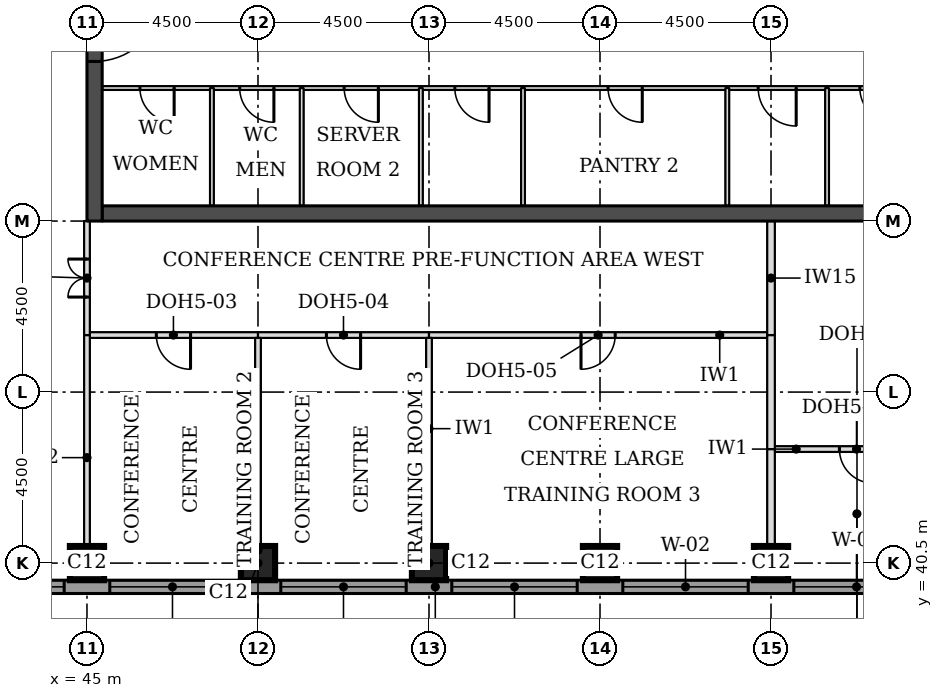
"""IFC4 building model, lengths in metres.
Left out: names, types, materials, properties, quantities, classifications, styles, units other than length and angle.
Written with IfcOpenShell. Run it as: python <this file> out.ifc"""

import sys

from ifc_helpers import new_model, si_unit, direction, frame, frame_2d, origin, origin_2d, place, context, subcontext, project, spatial, rectangle, extrude, element, fill, save


model = new_model("IFC4")
c1 = context("Model", 3, precision=1e-05, world=origin(), true_north=direction((0.0, 1.0)))
c2 = subcontext(c1, "Body", "Model", "MODEL_VIEW")
j1 = project(units=[si_unit("LENGTHUNIT", "METRE"), si_unit("PLANEANGLEUNIT", "RADIAN")], contexts=[c1])
p1 = place(None, origin())
s1 = spatial("IfcSite", under=j1, at=p1, CompositionType="ELEMENT")
p2 = place(p1, origin())
s2 = spatial("IfcBuilding", under=s1, at=p2, CompositionType="ELEMENT")
p3 = place(p2, frame((0.0, 0.0, 181.0)))
s3 = spatial("IfcBuildingStorey", under=s2, at=p3, CompositionType="ELEMENT", Elevation=181.0)
for number, where, z_axis, x_axis in (
    (1, (45.0, 40.5, 0.0), (0.0, 0.0, 1.0), (1.0, 0.0, 0.0)),
    (2, (49.5, 40.5, 0.0), (0.0, 0.0, 1.0), (1.0, 0.0, 0.0)),
    (3, (54.0, 40.5, 0.0), (0.0, 0.0, 1.0), (1.0, 0.0, 0.0)),
    (4, (58.5, 40.5, 0.0), (0.0, 0.0, 1.0), (1.0, 0.0, 0.0)),
    (5, (63.0, 40.5, 0.0), (0.0, 0.0, 1.0), (1.0, 0.0, 0.0)),
):
    element("IfcColumn", number, at=place(p3, frame(where, z_axis=z_axis, x_axis=x_axis)), inside=s3, PredefinedType="COLUMN", context=c2, shape_type="SweptSolid", body=[
        extrude(rectangle(XDim=0.9, YDim=0.9, at=origin_2d()), origin(), (0.0, 0.0, 1.0), 3.7),
    ])
p4 = place(p3, frame((45.4, 49.7, 0.0), z_axis=(0.0, 0.0, 1.0), x_axis=(1.0, 0.0, 0.0)))
e6 = element("IfcWall", 6, at=p4, inside=s3, PredefinedType="SHEAR", context=c2, shape_type="SweptSolid", body=[
    extrude(rectangle(XDim=21.7, YDim=0.4, at=frame_2d((10.85, 0.0))), origin(), (0.0, 0.0, 1.0), 3.7),
])
p5 = place(p3, frame((45.2, 49.5, 0.0), z_axis=(0.0, 0.0, 1.0), x_axis=(0.0, 1.0, 0.0)))
e7 = element("IfcWall", 7, at=p5, inside=s3, PredefinedType="SHEAR", context=c2, shape_type="SweptSolid", body=[
    extrude(rectangle(XDim=22.5, YDim=0.4, at=frame_2d((11.25, 0.0))), origin(), (0.0, 0.0, 1.0), 3.7),
])
p6 = place(p5, frame((4.2, 0.0, 0.0)))
e8 = element("IfcOpeningElement", 8, at=p6, cuts=e7, PredefinedType="OPENING", context=c2, shape_type="SweptSolid", body=[
    extrude(rectangle(XDim=1.8, YDim=2.1, at=frame_2d((0.9, 1.05))), frame((0.0, 0.21, 0.0), z_axis=(0.0, -1.0, 0.0), x_axis=(1.0, 0.0, 0.0)), (0.0, 0.0, 1.0), 0.42),
])
p7 = place(p5, frame((6.9, 0.0, 0.0)))
e9 = element("IfcOpeningElement", 9, at=p7, cuts=e7, PredefinedType="OPENING", context=c2, shape_type="SweptSolid", body=[
    extrude(rectangle(XDim=1.1, YDim=2.1, at=frame_2d((0.55, 1.05))), frame((0.0, 0.21, 0.0), z_axis=(0.0, -1.0, 0.0), x_axis=(1.0, 0.0, 0.0)), (0.0, 0.0, 1.0), 0.42),
])
p8 = place(p5, frame((13.6, 0.0, 0.0)))
e10 = element("IfcOpeningElement", 10, at=p8, cuts=e7, PredefinedType="OPENING", context=c2, shape_type="SweptSolid", body=[
    extrude(rectangle(XDim=1.1, YDim=2.1, at=frame_2d((0.55, 1.05))), frame((0.0, 0.21, 0.0), z_axis=(0.0, -1.0, 0.0), x_axis=(1.0, 0.0, 0.0)), (0.0, 0.0, 1.0), 0.42),
])
p9 = place(p5, frame((16.5, 0.0, 0.0)))
e11 = element("IfcOpeningElement", 11, at=p9, cuts=e7, PredefinedType="OPENING", context=c2, shape_type="SweptSolid", body=[
    extrude(rectangle(XDim=1.8, YDim=2.1, at=frame_2d((0.9, 1.05))), frame((0.0, 0.21, 0.0), z_axis=(0.0, -1.0, 0.0), x_axis=(1.0, 0.0, 0.0)), (0.0, 0.0, 1.0), 0.42),
])
p10 = place(p3, frame((36.0, 39.875, 0.0), z_axis=(0.0, 0.0, 1.0), x_axis=(1.0, 0.0, 0.0)))
e12 = element("IfcWall", 12, at=p10, inside=s3, PredefinedType="STANDARD", context=c2, shape_type="SweptSolid", body=[
    extrude(rectangle(XDim=36.331, YDim=0.35, at=frame_2d((18.166, 0.0))), origin(), (0.0, 0.0, 1.0), 3.525),
])
p11 = place(p10, frame((5.1, 0.0, 0.9)))
e13 = element("IfcOpeningElement", 13, at=p11, cuts=e12, PredefinedType="OPENING", context=c2, shape_type="SweptSolid", body=[
    extrude(rectangle(XDim=3.3, YDim=1.9, at=frame_2d((1.65, 0.95))), frame((0.0, 0.185, 0.0), z_axis=(0.0, -1.0, 0.0), x_axis=(1.0, 0.0, 0.0)), (0.0, 0.0, 1.0), 0.37),
])
p12 = place(p10, frame((9.6, 0.0, 0.9)))
e14 = element("IfcOpeningElement", 14, at=p12, cuts=e12, PredefinedType="OPENING", context=c2, shape_type="SweptSolid", body=[
    extrude(rectangle(XDim=3.3, YDim=1.9, at=frame_2d((1.65, 0.95))), frame((0.0, 0.185, 0.0), z_axis=(0.0, -1.0, 0.0), x_axis=(1.0, 0.0, 0.0)), (0.0, 0.0, 1.0), 0.37),
])
p13 = place(p10, frame((14.1, 0.0, 0.9)))
e15 = element("IfcOpeningElement", 15, at=p13, cuts=e12, PredefinedType="OPENING", context=c2, shape_type="SweptSolid", body=[
    extrude(rectangle(XDim=3.3, YDim=1.9, at=frame_2d((1.65, 0.95))), frame((0.0, 0.185, 0.0), z_axis=(0.0, -1.0, 0.0), x_axis=(1.0, 0.0, 0.0)), (0.0, 0.0, 1.0), 0.37),
])
p14 = place(p10, frame((18.6, 0.0, 0.9)))
e16 = element("IfcOpeningElement", 16, at=p14, cuts=e12, PredefinedType="OPENING", context=c2, shape_type="SweptSolid", body=[
    extrude(rectangle(XDim=3.3, YDim=1.9, at=frame_2d((1.65, 0.95))), frame((0.0, 0.185, 0.0), z_axis=(0.0, -1.0, 0.0), x_axis=(1.0, 0.0, 0.0)), (0.0, 0.0, 1.0), 0.37),
])
p15 = place(p10, frame((23.1, 0.0, 0.9)))
e17 = element("IfcOpeningElement", 17, at=p15, cuts=e12, PredefinedType="OPENING", context=c2, shape_type="SweptSolid", body=[
    extrude(rectangle(XDim=3.3, YDim=1.9, at=frame_2d((1.65, 0.95))), frame((0.0, 0.185, 0.0), z_axis=(0.0, -1.0, 0.0), x_axis=(1.0, 0.0, 0.0)), (0.0, 0.0, 1.0), 0.37),
])
p16 = place(p10, frame((27.6, 0.0, 0.9)))
e18 = element("IfcOpeningElement", 18, at=p16, cuts=e12, PredefinedType="OPENING", context=c2, shape_type="SweptSolid", body=[
    extrude(rectangle(XDim=3.3, YDim=1.9, at=frame_2d((1.65, 0.95))), frame((0.0, 0.185, 0.0), z_axis=(0.0, -1.0, 0.0), x_axis=(1.0, 0.0, 0.0)), (0.0, 0.0, 1.0), 0.37),
])
p17 = place(p3, frame((63.1, 43.5, 0.0), z_axis=(0.0, 0.0, 1.0), x_axis=(1.0, 0.0, 0.0)))
e19 = element("IfcWall", 19, at=p17, inside=s3, PredefinedType="PARTITIONING", context=c2, shape_type="SweptSolid", body=[
    extrude(rectangle(XDim=4.325, YDim=0.15, at=frame_2d((2.163, 0.0))), origin(), (0.0, 0.0, 1.0), 3.55),
])
p18 = place(p17, frame((1.7, 0.0, 0.0)))
e20 = element("IfcOpeningElement", 20, at=p18, cuts=e19, PredefinedType="OPENING", context=c2, shape_type="SweptSolid", body=[
    extrude(rectangle(XDim=0.9, YDim=2.1, at=frame_2d((0.45, 1.05))), frame((0.0, 0.085, 0.0), z_axis=(0.0, -1.0, 0.0), x_axis=(1.0, 0.0, 0.0)), (0.0, 0.0, 1.0), 0.17),
])
p19 = place(p3, frame((45.075, 46.5, 0.0), z_axis=(0.0, 0.0, 1.0), x_axis=(1.0, 0.0, 0.0)))
e21 = element("IfcWall", 21, at=p19, inside=s3, PredefinedType="PARTITIONING", context=c2, shape_type="SweptSolid", body=[
    extrude(rectangle(XDim=4.425, YDim=0.15, at=frame_2d((2.212, 0.0))), origin(), (0.0, 0.0, 1.0), 3.55),
])
p20 = place(p19, frame((1.75, 0.0, 0.0)))
e22 = element("IfcOpeningElement", 22, at=p20, cuts=e21, PredefinedType="OPENING", context=c2, shape_type="SweptSolid", body=[
    extrude(rectangle(XDim=0.9, YDim=2.1, at=frame_2d((0.45, 1.05))), frame((0.0, 0.085, 0.0), z_axis=(0.0, -1.0, 0.0), x_axis=(1.0, 0.0, 0.0)), (0.0, 0.0, 1.0), 0.17),
])
p21 = place(p3, frame((49.5, 46.5, 0.0), z_axis=(0.0, 0.0, 1.0), x_axis=(1.0, 0.0, 0.0)))
e23 = element("IfcWall", 23, at=p21, inside=s3, PredefinedType="PARTITIONING", context=c2, shape_type="SweptSolid", body=[
    extrude(rectangle(XDim=4.5, YDim=0.15, at=frame_2d((2.25, 0.0))), origin(), (0.0, 0.0, 1.0), 3.55),
])
p22 = place(p21, frame((1.8, 0.0, 0.0)))
e24 = element("IfcOpeningElement", 24, at=p22, cuts=e23, PredefinedType="OPENING", context=c2, shape_type="SweptSolid", body=[
    extrude(rectangle(XDim=0.9, YDim=2.1, at=frame_2d((0.45, 1.05))), frame((0.0, 0.085, 0.0), z_axis=(0.0, -1.0, 0.0), x_axis=(1.0, 0.0, 0.0)), (0.0, 0.0, 1.0), 0.17),
])
p23 = place(p3, frame((54.0, 46.5, 0.0), z_axis=(0.0, 0.0, 1.0), x_axis=(1.0, 0.0, 0.0)))
e25 = element("IfcWall", 25, at=p23, inside=s3, PredefinedType="PARTITIONING", context=c2, shape_type="SweptSolid", body=[
    extrude(rectangle(XDim=8.9, YDim=0.15, at=frame_2d((4.45, 0.0))), origin(), (0.0, 0.0, 1.0), 3.55),
])
p24 = place(p23, frame((4.0, 0.0, 0.0)))
e26 = element("IfcOpeningElement", 26, at=p24, cuts=e25, PredefinedType="OPENING", context=c2, shape_type="SweptSolid", body=[
    extrude(rectangle(XDim=0.9, YDim=2.1, at=frame_2d((0.45, 1.05))), frame((0.0, 0.085, 0.0), z_axis=(0.0, -1.0, 0.0), x_axis=(1.0, 0.0, 0.0)), (0.0, 0.0, 1.0), 0.17),
])
p25 = place(p3, frame((45.0, 40.05, 0.0), z_axis=(0.0, 0.0, 1.0), x_axis=(0.0, 1.0, 0.0)))
e27 = element("IfcWall", 27, at=p25, inside=s3, PredefinedType="PARTITIONING", context=c2, shape_type="SweptSolid", body=[
    extrude(rectangle(XDim=6.45, YDim=0.15, at=frame_2d((3.225, 0.0))), origin(), (0.0, 0.0, 1.0), 3.022),
])
for number, where, z_axis, x_axis in (
    (28, (49.5, 40.05, 0.0), (0.0, 0.0, 1.0), (0.0, 1.0, 0.0)),
    (29, (54.0, 40.05, 0.0), (0.0, 0.0, 1.0), (0.0, 1.0, 0.0)),
):
    element("IfcWall", number, at=place(p3, frame(where, z_axis=z_axis, x_axis=x_axis)), inside=s3, PredefinedType="PARTITIONING", context=c2, shape_type="SweptSolid", body=[
        extrude(rectangle(XDim=6.375, YDim=0.15, at=frame_2d((3.188, 0.0))), origin(), (0.0, 0.0, 1.0), 3.55),
    ])
p26 = place(p3, frame((63.0, 40.05, 0.0), z_axis=(0.0, 0.0, 1.0), x_axis=(0.0, 1.0, 0.0)))
e30 = element("IfcWall", 30, at=p26, inside=s3, PredefinedType="PARTITIONING", context=c2, shape_type="SweptSolid", body=[
    extrude(rectangle(XDim=3.45, YDim=0.2, at=frame_2d((1.725, 0.0))), origin(), (0.0, 0.0, 1.0), 3.55),
])
p27 = place(p3, frame((63.0, 43.5, 0.0), z_axis=(0.0, 0.0, 1.0), x_axis=(0.0, 1.0, 0.0)))
e31 = element("IfcWall", 31, at=p27, inside=s3, PredefinedType="PARTITIONING", context=c2, shape_type="SweptSolid", body=[
    extrude(rectangle(XDim=3.0, YDim=0.2, at=frame_2d((1.5, 0.0))), origin(), (0.0, 0.0, 1.0), 3.55),
])
p28 = place(p3, frame((45.0, 46.5, 0.0), z_axis=(0.0, 0.0, 1.0), x_axis=(0.0, 1.0, 0.0)))
e32 = element("IfcWall", 32, at=p28, inside=s3, PredefinedType="PARTITIONING", context=c2, shape_type="SweptSolid", body=[
    extrude(rectangle(XDim=3.0, YDim=0.15, at=frame_2d((1.5, 0.0))), origin(), (0.0, 0.0, 1.0), 3.022),
])
p29 = place(p28, frame((1.0, 0.0, 0.0)))
e33 = element("IfcOpeningElement", 33, at=p29, cuts=e32, PredefinedType="OPENING", context=c2, shape_type="SweptSolid", body=[
    extrude(rectangle(XDim=1.0, YDim=2.1, at=frame_2d((0.5, 1.05))), frame((0.0, 0.085, 0.0), z_axis=(0.0, -1.0, 0.0), x_axis=(1.0, 0.0, 0.0)), (0.0, 0.0, 1.0), 0.17),
])
p30 = place(p3, frame((63.0, 46.5, 0.0), z_axis=(0.0, 0.0, 1.0), x_axis=(0.0, 1.0, 0.0)))
e34 = element("IfcWall", 34, at=p30, inside=s3, PredefinedType="PARTITIONING", context=c2, shape_type="SweptSolid", body=[
    extrude(rectangle(XDim=3.0, YDim=0.2, at=frame_2d((1.5, 0.0))), origin(), (0.0, 0.0, 1.0), 3.55),
])
p31 = place(p3, frame((45.4, 53.0, 0.0), z_axis=(0.0, 0.0, 1.0), x_axis=(1.0, 0.0, 0.0)))
e35 = element("IfcWall", 35, at=p31, inside=s3, PredefinedType="PARTITIONING", context=c2, shape_type="SweptSolid", body=[
    extrude(rectangle(XDim=21.7, YDim=0.1, at=frame_2d((10.85, 0.0))), origin(), (0.0, 0.0, 1.0), 3.55),
])
p32 = place(p31, frame((19.938, 0.0, 0.0)))
e36 = element("IfcOpeningElement", 36, at=p32, cuts=e35, PredefinedType="OPENING", context=c2, shape_type="SweptSolid", body=[
    extrude(rectangle(XDim=0.9, YDim=2.1, at=frame_2d((0.45, 1.05))), frame((0.0, 0.06, 0.0), z_axis=(0.0, -1.0, 0.0), x_axis=(1.0, 0.0, 0.0)), (0.0, 0.0, 1.0), 0.12),
])
p33 = place(p31, frame((17.262, 0.0, 0.0)))
e37 = element("IfcOpeningElement", 37, at=p33, cuts=e35, PredefinedType="OPENING", context=c2, shape_type="SweptSolid", body=[
    extrude(rectangle(XDim=1.0, YDim=2.1, at=frame_2d((0.5, 1.05))), frame((0.0, 0.06, 0.0), z_axis=(0.0, -1.0, 0.0), x_axis=(1.0, 0.0, 0.0)), (0.0, 0.0, 1.0), 0.12),
])
p34 = place(p31, frame((0.994, 0.0, 0.0)))
e38 = element("IfcOpeningElement", 38, at=p34, cuts=e35, PredefinedType="OPENING", context=c2, shape_type="SweptSolid", body=[
    extrude(rectangle(XDim=0.9, YDim=2.1, at=frame_2d((0.45, 1.05))), frame((0.0, 0.06, 0.0), z_axis=(0.0, -1.0, 0.0), x_axis=(1.0, 0.0, 0.0)), (0.0, 0.0, 1.0), 0.12),
])
p35 = place(p31, frame((3.619, 0.0, 0.0)))
e39 = element("IfcOpeningElement", 39, at=p35, cuts=e35, PredefinedType="OPENING", context=c2, shape_type="SweptSolid", body=[
    extrude(rectangle(XDim=0.9, YDim=2.1, at=frame_2d((0.45, 1.05))), frame((0.0, 0.06, 0.0), z_axis=(0.0, -1.0, 0.0), x_axis=(1.0, 0.0, 0.0)), (0.0, 0.0, 1.0), 0.12),
])
p36 = place(p31, frame((6.368, 0.0, 0.0)))
e40 = element("IfcOpeningElement", 40, at=p36, cuts=e35, PredefinedType="OPENING", context=c2, shape_type="SweptSolid", body=[
    extrude(rectangle(XDim=0.9, YDim=2.1, at=frame_2d((0.45, 1.05))), frame((0.0, 0.06, 0.0), z_axis=(0.0, -1.0, 0.0), x_axis=(1.0, 0.0, 0.0)), (0.0, 0.0, 1.0), 0.12),
])
p37 = place(p31, frame((9.28, 0.0, 0.0)))
e41 = element("IfcOpeningElement", 41, at=p37, cuts=e35, PredefinedType="OPENING", context=c2, shape_type="SweptSolid", body=[
    extrude(rectangle(XDim=0.9, YDim=2.1, at=frame_2d((0.45, 1.05))), frame((0.0, 0.06, 0.0), z_axis=(0.0, -1.0, 0.0), x_axis=(1.0, 0.0, 0.0)), (0.0, 0.0, 1.0), 0.12),
])
p38 = place(p31, frame((13.312, 0.0, 0.0)))
e42 = element("IfcOpeningElement", 42, at=p38, cuts=e35, PredefinedType="OPENING", context=c2, shape_type="SweptSolid", body=[
    extrude(rectangle(XDim=0.9, YDim=2.1, at=frame_2d((0.45, 1.05))), frame((0.0, 0.06, 0.0), z_axis=(0.0, -1.0, 0.0), x_axis=(1.0, 0.0, 0.0)), (0.0, 0.0, 1.0), 0.12),
])
for number, where, z_axis, x_axis in (
    (43, (48.288, 49.9, 0.0), (0.0, 0.0, 1.0), (0.0, 1.0, 0.0)),
    (44, (50.65, 49.9, 0.0), (0.0, 0.0, 1.0), (0.0, 1.0, 0.0)),
    (45, (53.786, 49.9, 0.0), (0.0, 0.0, 1.0), (0.0, 1.0, 0.0)),
    (46, (56.474, 49.9, 0.0), (0.0, 0.0, 1.0), (0.0, 1.0, 0.0)),
    (47, (61.85, 49.9, 0.0), (0.0, 0.0, 1.0), (0.0, 1.0, 0.0)),
    (48, (64.475, 49.9, 0.0), (0.0, 0.0, 1.0), (0.0, 1.0, 0.0)),
):
    element("IfcWall", number, at=place(p3, frame(where, z_axis=z_axis, x_axis=x_axis)), inside=s3, PredefinedType="PARTITIONING", context=c2, shape_type="SweptSolid", body=[
        extrude(rectangle(XDim=3.1, YDim=0.1, at=frame_2d((1.55, 0.0))), origin(), (0.0, 0.0, 1.0), 3.55),
    ])
p39 = place(p11, origin())
e49 = element("IfcWindow", 49, at=p39, inside=s3, PartitioningType="SINGLE_PANEL", PredefinedType="WINDOW", context=c2, shape_type="SweptSolid", body=[
    extrude(rectangle(XDim=3.3, YDim=1.9, at=frame_2d((1.65, 0.95))), frame((0.0, 0.085, 0.0), z_axis=(0.0, -1.0, 0.0), x_axis=(1.0, 0.0, 0.0)), (0.0, 0.0, 1.0), 0.06),
])
fill(e13, e49)
p40 = place(p12, origin())
e50 = element("IfcWindow", 50, at=p40, inside=s3, PartitioningType="SINGLE_PANEL", PredefinedType="WINDOW", context=c2, shape_type="SweptSolid", body=[
    extrude(rectangle(XDim=3.3, YDim=1.9, at=frame_2d((1.65, 0.95))), frame((0.0, 0.085, 0.0), z_axis=(0.0, -1.0, 0.0), x_axis=(1.0, 0.0, 0.0)), (0.0, 0.0, 1.0), 0.06),
])
fill(e14, e50)
p41 = place(p13, origin())
e51 = element("IfcWindow", 51, at=p41, inside=s3, PartitioningType="SINGLE_PANEL", PredefinedType="WINDOW", context=c2, shape_type="SweptSolid", body=[
    extrude(rectangle(XDim=3.3, YDim=1.9, at=frame_2d((1.65, 0.95))), frame((0.0, 0.085, 0.0), z_axis=(0.0, -1.0, 0.0), x_axis=(1.0, 0.0, 0.0)), (0.0, 0.0, 1.0), 0.06),
])
fill(e15, e51)
p42 = place(p14, origin())
e52 = element("IfcWindow", 52, at=p42, inside=s3, PartitioningType="SINGLE_PANEL", PredefinedType="WINDOW", context=c2, shape_type="SweptSolid", body=[
    extrude(rectangle(XDim=3.3, YDim=1.9, at=frame_2d((1.65, 0.95))), frame((0.0, 0.085, 0.0), z_axis=(0.0, -1.0, 0.0), x_axis=(1.0, 0.0, 0.0)), (0.0, 0.0, 1.0), 0.06),
])
fill(e16, e52)
p43 = place(p15, origin())
e53 = element("IfcWindow", 53, at=p43, inside=s3, PartitioningType="SINGLE_PANEL", PredefinedType="WINDOW", context=c2, shape_type="SweptSolid", body=[
    extrude(rectangle(XDim=3.3, YDim=1.9, at=frame_2d((1.65, 0.95))), frame((0.0, 0.085, 0.0), z_axis=(0.0, -1.0, 0.0), x_axis=(1.0, 0.0, 0.0)), (0.0, 0.0, 1.0), 0.06),
])
fill(e17, e53)
p44 = place(p16, origin())
e54 = element("IfcWindow", 54, at=p44, inside=s3, PartitioningType="SINGLE_PANEL", PredefinedType="WINDOW", context=c2, shape_type="SweptSolid", body=[
    extrude(rectangle(XDim=3.3, YDim=1.9, at=frame_2d((1.65, 0.95))), frame((0.0, 0.085, 0.0), z_axis=(0.0, -1.0, 0.0), x_axis=(1.0, 0.0, 0.0)), (0.0, 0.0, 1.0), 0.06),
])
fill(e18, e54)
p45 = place(p29, origin())
e55 = element("IfcDoor", 55, at=p45, inside=s3, OperationType="DOUBLE_DOOR_SINGLE_SWING", PredefinedType="DOOR", context=c2, shape_type="SweptSolid", body=[
    extrude(rectangle(XDim=1.0, YDim=2.1, at=frame_2d((0.5, 1.05))), frame((0.0, 0.025, 0.0), z_axis=(0.0, -1.0, 0.0), x_axis=(1.0, 0.0, 0.0)), (0.0, 0.0, 1.0), 0.05),
])
fill(e33, e55)
p46 = place(p20, frame((0.9, 0.0, 0.0), z_axis=(0.0, 0.0, 1.0), x_axis=(-1.0, 0.0, 0.0)))
e56 = element("IfcDoor", 56, at=p46, inside=s3, OperationType="SINGLE_SWING_LEFT", PredefinedType="DOOR", context=c2, shape_type="SweptSolid", body=[
    extrude(rectangle(XDim=0.9, YDim=2.1, at=frame_2d((0.45, 1.05))), frame((0.0, 0.025, 0.0), z_axis=(0.0, -1.0, 0.0), x_axis=(1.0, 0.0, 0.0)), (0.0, 0.0, 1.0), 0.05),
])
fill(e22, e56)
p47 = place(p22, frame((0.9, 0.0, 0.0), z_axis=(0.0, 0.0, 1.0), x_axis=(-1.0, 0.0, 0.0)))
e57 = element("IfcDoor", 57, at=p47, inside=s3, OperationType="SINGLE_SWING_LEFT", PredefinedType="DOOR", context=c2, shape_type="SweptSolid", body=[
    extrude(rectangle(XDim=0.9, YDim=2.1, at=frame_2d((0.45, 1.05))), frame((0.0, 0.025, 0.0), z_axis=(0.0, -1.0, 0.0), x_axis=(1.0, 0.0, 0.0)), (0.0, 0.0, 1.0), 0.05),
])
fill(e24, e57)
p48 = place(p24, frame((0.9, 0.0, 0.0), z_axis=(0.0, 0.0, 1.0), x_axis=(-1.0, 0.0, 0.0)))
e58 = element("IfcDoor", 58, at=p48, inside=s3, OperationType="SINGLE_SWING_RIGHT", PredefinedType="DOOR", context=c2, shape_type="SweptSolid", body=[
    extrude(rectangle(XDim=0.9, YDim=2.1, at=frame_2d((0.45, 1.05))), frame((0.0, 0.025, 0.0), z_axis=(0.0, -1.0, 0.0), x_axis=(1.0, 0.0, 0.0)), (0.0, 0.0, 1.0), 0.05),
])
fill(e26, e58)
p49 = place(p18, frame((0.9, 0.0, 0.0), z_axis=(0.0, 0.0, 1.0), x_axis=(-1.0, 0.0, 0.0)))
e59 = element("IfcDoor", 59, at=p49, inside=s3, OperationType="SINGLE_SWING_LEFT", PredefinedType="DOOR", context=c2, shape_type="SweptSolid", body=[
    extrude(rectangle(XDim=0.9, YDim=2.1, at=frame_2d((0.45, 1.05))), frame((0.0, 0.025, 0.0), z_axis=(0.0, -1.0, 0.0), x_axis=(1.0, 0.0, 0.0)), (0.0, 0.0, 1.0), 0.05),
])
fill(e20, e59)
p50 = place(p6, frame((1.8, 0.0, 0.0), z_axis=(0.0, 0.0, 1.0), x_axis=(-1.0, 0.0, 0.0)))
e60 = element("IfcDoor", 60, at=p50, inside=s3, OperationType="SINGLE_SWING_LEFT", PredefinedType="DOOR", context=c2, shape_type="SweptSolid", body=[
    extrude(rectangle(XDim=1.8, YDim=2.1, at=frame_2d((0.9, 1.05))), frame((0.0, 0.025, 0.0), z_axis=(0.0, -1.0, 0.0), x_axis=(1.0, 0.0, 0.0)), (0.0, 0.0, 1.0), 0.05),
])
fill(e8, e60)
p51 = place(p32, frame((0.9, 0.0, 0.0), z_axis=(0.0, 0.0, 1.0), x_axis=(-1.0, 0.0, 0.0)))
e61 = element("IfcDoor", 61, at=p51, inside=s3, OperationType="SINGLE_SWING_LEFT", PredefinedType="DOOR", context=c2, shape_type="SweptSolid", body=[
    extrude(rectangle(XDim=0.9, YDim=2.1, at=frame_2d((0.45, 1.05))), frame((0.0, 0.025, 0.0), z_axis=(0.0, -1.0, 0.0), x_axis=(1.0, 0.0, 0.0)), (0.0, 0.0, 1.0), 0.05),
])
fill(e36, e61)
p52 = place(p33, frame((1.0, 0.0, 0.0), z_axis=(0.0, 0.0, 1.0), x_axis=(-1.0, 0.0, 0.0)))
e62 = element("IfcDoor", 62, at=p52, inside=s3, OperationType="SINGLE_SWING_LEFT", PredefinedType="DOOR", context=c2, shape_type="SweptSolid", body=[
    extrude(rectangle(XDim=1.0, YDim=2.1, at=frame_2d((0.5, 1.05))), frame((0.0, 0.025, 0.0), z_axis=(0.0, -1.0, 0.0), x_axis=(1.0, 0.0, 0.0)), (0.0, 0.0, 1.0), 0.05),
])
fill(e37, e62)
p53 = place(p34, frame((0.9, 0.0, 0.0), z_axis=(0.0, 0.0, 1.0), x_axis=(-1.0, 0.0, 0.0)))
e63 = element("IfcDoor", 63, at=p53, inside=s3, OperationType="SINGLE_SWING_LEFT", PredefinedType="DOOR", context=c2, shape_type="SweptSolid", body=[
    extrude(rectangle(XDim=0.9, YDim=2.1, at=frame_2d((0.45, 1.05))), frame((0.0, 0.025, 0.0), z_axis=(0.0, -1.0, 0.0), x_axis=(1.0, 0.0, 0.0)), (0.0, 0.0, 1.0), 0.05),
])
fill(e38, e63)
p54 = place(p35, frame((0.9, 0.0, 0.0), z_axis=(0.0, 0.0, 1.0), x_axis=(-1.0, 0.0, 0.0)))
e64 = element("IfcDoor", 64, at=p54, inside=s3, OperationType="SINGLE_SWING_LEFT", PredefinedType="DOOR", context=c2, shape_type="SweptSolid", body=[
    extrude(rectangle(XDim=0.9, YDim=2.1, at=frame_2d((0.45, 1.05))), frame((0.0, 0.025, 0.0), z_axis=(0.0, -1.0, 0.0), x_axis=(1.0, 0.0, 0.0)), (0.0, 0.0, 1.0), 0.05),
])
fill(e39, e64)
p55 = place(p36, frame((0.9, 0.0, 0.0), z_axis=(0.0, 0.0, 1.0), x_axis=(-1.0, 0.0, 0.0)))
e65 = element("IfcDoor", 65, at=p55, inside=s3, OperationType="SINGLE_SWING_LEFT", PredefinedType="DOOR", context=c2, shape_type="SweptSolid", body=[
    extrude(rectangle(XDim=0.9, YDim=2.1, at=frame_2d((0.45, 1.05))), frame((0.0, 0.025, 0.0), z_axis=(0.0, -1.0, 0.0), x_axis=(1.0, 0.0, 0.0)), (0.0, 0.0, 1.0), 0.05),
])
fill(e40, e65)
p56 = place(p37, frame((0.9, 0.0, 0.0), z_axis=(0.0, 0.0, 1.0), x_axis=(-1.0, 0.0, 0.0)))
e66 = element("IfcDoor", 66, at=p56, inside=s3, OperationType="SINGLE_SWING_LEFT", PredefinedType="DOOR", context=c2, shape_type="SweptSolid", body=[
    extrude(rectangle(XDim=0.9, YDim=2.1, at=frame_2d((0.45, 1.05))), frame((0.0, 0.025, 0.0), z_axis=(0.0, -1.0, 0.0), x_axis=(1.0, 0.0, 0.0)), (0.0, 0.0, 1.0), 0.05),
])
fill(e41, e66)
p57 = place(p38, frame((0.9, 0.0, 0.0), z_axis=(0.0, 0.0, 1.0), x_axis=(-1.0, 0.0, 0.0)))
e67 = element("IfcDoor", 67, at=p57, inside=s3, OperationType="SINGLE_SWING_LEFT", PredefinedType="DOOR", context=c2, shape_type="SweptSolid", body=[
    extrude(rectangle(XDim=0.9, YDim=2.1, at=frame_2d((0.45, 1.05))), frame((0.0, 0.025, 0.0), z_axis=(0.0, -1.0, 0.0), x_axis=(1.0, 0.0, 0.0)), (0.0, 0.0, 1.0), 0.05),
])
fill(e42, e67)
save(model, sys.argv[1])
